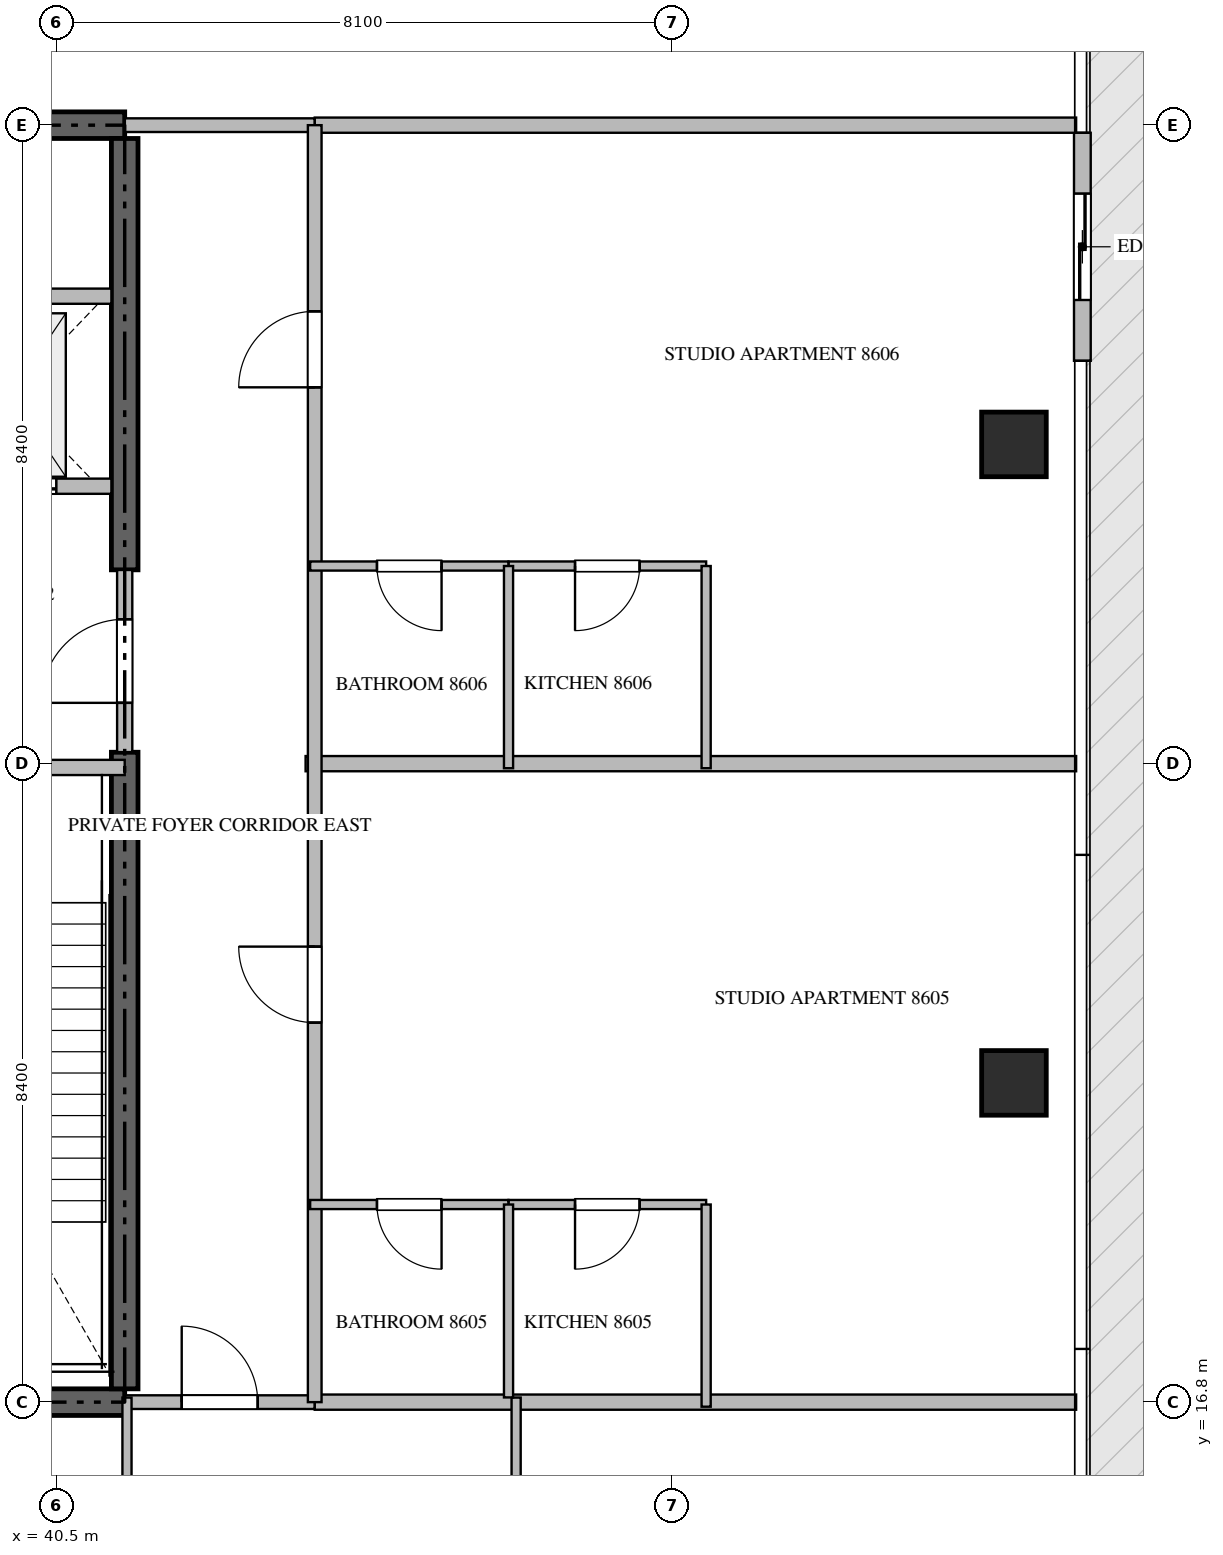
"""IFC4 building model, lengths in metres.
Left out: names, types, materials, properties, quantities, classifications, styles, units other than length and angle.
Written with IfcOpenShell. Run it as: python <this file> out.ifc"""

import sys

from ifc_helpers import new_model, si_unit, direction, frame, frame_2d, origin, origin_2d, place, context, subcontext, project, spatial, rectangle, extrude, source, transform, mapped, element, fill, save


model = new_model("IFC4")
c1 = context("Model", 3, precision=1e-05, world=origin(), true_north=direction((0.0, 1.0)))
c2 = subcontext(c1, "Body", "Model", "MODEL_VIEW")
j1 = project(units=[si_unit("LENGTHUNIT", "METRE"), si_unit("PLANEANGLEUNIT", "RADIAN")], contexts=[c1])
p1 = place(None, origin())
s1 = spatial("IfcSite", under=j1, at=p1, CompositionType="ELEMENT")
p2 = place(p1, origin())
s2 = spatial("IfcBuilding", under=s1, at=p2, CompositionType="ELEMENT")
p3 = place(p2, frame((0.0, 0.0, 347.95)))
s3 = spatial("IfcBuildingStorey", under=s2, at=p3, CompositionType="ELEMENT", Elevation=347.95)
for number, where, z_axis, x_axis in (
    (1, (23.4, 16.8, -0.26), (0.0, 0.0, 1.0), (1.0, 0.0, 0.0)),
    (2, (41.4, 33.6, -0.26), (0.0, 0.0, 1.0), (-1.0, 0.0, 0.0)),
):
    element("IfcWall", number, at=place(p3, frame(where, z_axis=z_axis, x_axis=x_axis)), inside=s3, PredefinedType="SHEAR", context=c2, shape_type="SweptSolid", body=[
        extrude(rectangle(XDim=18.0, YDim=0.35, at=frame_2d((9.0, 0.0))), origin(), (0.0, 0.0, 1.0), 5.898),
    ])
p4 = place(p3, frame((41.4, 16.975, -0.26), z_axis=(0.0, 0.0, 1.0), x_axis=(0.0, 1.0, 0.0)))
e3 = element("IfcWall", 3, at=p4, inside=s3, PredefinedType="SHEAR", context=c2, shape_type="SweptSolid", body=[
    extrude(rectangle(XDim=8.375, YDim=0.35, at=frame_2d((4.188, 0.0))), origin(), (0.0, 0.0, 1.0), 5.898),
])
p5 = place(p3, frame((41.4, 27.75, -0.26), z_axis=(0.0, 0.0, 1.0), x_axis=(0.0, 1.0, 0.0)))
e4 = element("IfcWall", 4, at=p5, inside=s3, PredefinedType="SHEAR", context=c2, shape_type="SweptSolid", body=[
    extrude(rectangle(XDim=5.675, YDim=0.35, at=frame_2d((2.837, 0.0))), origin(), (0.0, 0.0, 1.0), 5.898),
])
m1 = source(origin(), c2, "Body", "SweptSolid", [
    extrude(rectangle(XDim=0.85, YDim=0.85, at=origin_2d()), origin(), (0.0, 0.0, 1.0), 5.9),
])
for number, where, z_axis, x_axis in (
    (5, (53.1, 21.0, -0.26), (0.0, 0.0, 1.0), (1.0, 0.0, 0.0)),
    (6, (53.1, 29.4, -0.26), (0.0, 0.0, 1.0), (1.0, 0.0, 0.0)),
):
    element("IfcColumn", number, at=place(p3, frame(where, z_axis=z_axis, x_axis=x_axis)), inside=s3, PredefinedType="COLUMN", context=c2, shape_type="MappedRepresentation", body=[
        mapped(m1, transform((0.0, 0.0, 0.0), scale=1.0)),
    ])
p6 = place(p3, frame((54.0, 30.5, 0.0), z_axis=(0.0, 0.0, 1.0), x_axis=(0.0, 1.0, 0.0)))
e7 = element("IfcWall", 7, at=p6, inside=s3, PredefinedType="ELEMENTEDWALL", context=c2, shape_type="SweptSolid", body=[
    extrude(rectangle(XDim=3.0, YDim=0.22, at=frame_2d((1.5, 0.0))), origin(), (0.0, 0.0, 1.0), 5.625),
])
p7 = place(p6, frame((0.8, 0.0, 0.0)))
e8 = element("IfcOpeningElement", 8, at=p7, cuts=e7, PredefinedType="OPENING", context=c2, shape_type="SweptSolid", body=[
    extrude(rectangle(XDim=1.4, YDim=2.25, at=frame_2d((0.7, 1.125))), frame((0.0, 0.12, 0.0), z_axis=(0.0, -1.0, 0.0), x_axis=(1.0, 0.0, 0.0)), (0.0, 0.0, 1.0), 0.24),
])
p8 = place(p3, frame((36.95, 25.15, 0.0), z_axis=(0.0, 0.0, 1.0), x_axis=(1.0, 0.0, 0.0)))
e9 = element("IfcWall", 9, at=p8, inside=s3, PredefinedType="STANDARD", context=c2, shape_type="SweptSolid", body=[
    extrude(rectangle(XDim=4.45, YDim=0.2, at=frame_2d((2.225, 0.0))), origin(), (0.0, 0.0, 1.0), 5.64),
])
p9 = place(p8, frame((1.65, 0.0, 0.0)))
e10 = element("IfcOpeningElement", 10, at=p9, cuts=e9, PredefinedType="OPENING", context=c2, shape_type="SweptSolid", body=[
    extrude(rectangle(XDim=1.1, YDim=2.15, at=frame_2d((0.55, 1.075))), frame((0.0, 0.11, 0.0), z_axis=(0.0, -1.0, 0.0), x_axis=(1.0, 0.0, 0.0)), (0.0, 0.0, 1.0), 0.22),
])
p10 = place(p3, frame((38.75, 28.85, 0.0), z_axis=(0.0, 0.0, 1.0), x_axis=(1.0, 0.0, 0.0)))
e11 = element("IfcWall", 11, at=p10, inside=s3, PredefinedType="STANDARD", context=c2, shape_type="SweptSolid", body=[
    extrude(rectangle(XDim=2.475, YDim=0.2, at=frame_2d((1.238, 0.0))), origin(), (0.0, 0.0, 1.0), 5.64),
])
p11 = place(p10, frame((0.55, 0.0, 0.0)))
e12 = element("IfcOpeningElement", 12, at=p11, cuts=e11, PredefinedType="OPENING", context=c2, shape_type="SweptSolid", body=[
    extrude(rectangle(XDim=1.2, YDim=2.2, at=frame_2d((0.6, 1.1))), frame((0.0, 0.11, 0.0), z_axis=(0.0, -1.0, 0.0), x_axis=(1.0, 0.0, 0.0)), (0.0, 0.0, 1.0), 0.22),
])
p12 = place(p3, frame((38.75, 31.35, 0.0), z_axis=(0.0, 0.0, 1.0), x_axis=(1.0, 0.0, 0.0)))
e13 = element("IfcWall", 13, at=p12, inside=s3, PredefinedType="STANDARD", context=c2, shape_type="SweptSolid", body=[
    extrude(rectangle(XDim=2.475, YDim=0.2, at=frame_2d((1.238, 0.0))), origin(), (0.0, 0.0, 1.0), 5.64),
])
p13 = place(p3, frame((41.4, 25.352, 0.0), z_axis=(0.0, 0.0, 1.0), x_axis=(0.0, 1.0, 0.0)))
e14 = element("IfcWall", 14, at=p13, inside=s3, PredefinedType="STANDARD", context=c2, shape_type="SweptSolid", body=[
    extrude(rectangle(XDim=2.396, YDim=0.2, at=frame_2d((1.198, 0.0))), origin(), (0.0, 0.0, 1.0), 5.64),
])
p14 = place(p13, frame((0.648, 0.0, 0.0)))
e15 = element("IfcOpeningElement", 15, at=p14, cuts=e14, PredefinedType="OPENING", context=c2, shape_type="SweptSolid", body=[
    extrude(rectangle(XDim=1.1, YDim=2.15, at=frame_2d((0.55, 1.075))), frame((0.0, 0.11, 0.0), z_axis=(0.0, -1.0, 0.0), x_axis=(1.0, 0.0, 0.0)), (0.0, 0.0, 1.0), 0.22),
])
p15 = place(p3, frame((43.78, 25.2, 0.0), z_axis=(0.0, 0.0, 1.0), x_axis=(1.0, 0.0, 0.0)))
e16 = element("IfcWall", 16, at=p15, inside=s3, PredefinedType="PARTITIONING", context=c2, shape_type="SweptSolid", body=[
    extrude(rectangle(XDim=10.138, YDim=0.2, at=frame_2d((5.069, 0.0))), origin(), (0.0, 0.0, 1.0), 5.64),
])
for number, where, z_axis, x_axis in (
    (17, (43.9, 16.8, 0.0), (0.0, 0.0, 1.0), (1.0, 0.0, 0.0)),
    (18, (43.9, 33.6, 0.0), (0.0, 0.0, 1.0), (1.0, 0.0, 0.0)),
):
    element("IfcWall", number, at=place(p3, frame(where, z_axis=z_axis, x_axis=x_axis)), inside=s3, PredefinedType="PARTITIONING", context=c2, shape_type="SweptSolid", body=[
        extrude(rectangle(XDim=10.018, YDim=0.2, at=frame_2d((5.009, 0.0))), origin(), (0.0, 0.0, 1.0), 5.64),
    ])
p16 = place(p3, frame((41.402, 16.8, 0.0), z_axis=(0.0, 0.0, 1.0), x_axis=(1.0, 0.0, 0.0)))
e19 = element("IfcWall", 19, at=p16, inside=s3, PredefinedType="PARTITIONING", context=c2, shape_type="SweptSolid", body=[
    extrude(rectangle(XDim=2.496, YDim=0.18, at=frame_2d((1.248, 0.0))), origin(), (0.0, 0.0, 1.0), 5.64),
])
p17 = place(p16, frame((0.748, 0.0, 0.0)))
e20 = element("IfcOpeningElement", 20, at=p17, cuts=e19, PredefinedType="OPENING", context=c2, shape_type="SweptSolid", body=[
    extrude(rectangle(XDim=1.0, YDim=2.15, at=frame_2d((0.5, 1.075))), frame((0.0, 0.1, 0.0), z_axis=(0.0, -1.0, 0.0), x_axis=(1.0, 0.0, 0.0)), (0.0, 0.0, 1.0), 0.2),
])
p18 = place(p3, frame((41.402, 33.6, 0.0), z_axis=(0.0, 0.0, 1.0), x_axis=(1.0, 0.0, 0.0)))
e21 = element("IfcWall", 21, at=p18, inside=s3, PredefinedType="PARTITIONING", context=c2, shape_type="SweptSolid", body=[
    extrude(rectangle(XDim=2.496, YDim=0.18, at=frame_2d((1.248, 0.0))), origin(), (0.0, 0.0, 1.0), 5.64),
])
p19 = place(p3, frame((43.9, 16.8, 0.0), z_axis=(0.0, 0.0, 1.0), x_axis=(0.0, 1.0, 0.0)))
e22 = element("IfcWall", 22, at=p19, inside=s3, PredefinedType="PARTITIONING", context=c2, shape_type="SweptSolid", body=[
    extrude(rectangle(XDim=16.8, YDim=0.18, at=frame_2d((8.4, 0.0))), origin(), (0.0, 0.0, 1.0), 5.64),
])
p20 = place(p19, frame((4.993, 0.0, 0.0)))
e23 = element("IfcOpeningElement", 23, at=p20, cuts=e22, PredefinedType="OPENING", context=c2, shape_type="SweptSolid", body=[
    extrude(rectangle(XDim=1.0, YDim=2.15, at=frame_2d((0.5, 1.075))), frame((0.0, 0.1, 0.0), z_axis=(0.0, -1.0, 0.0), x_axis=(1.0, 0.0, 0.0)), (0.0, 0.0, 1.0), 0.2),
])
p21 = place(p19, frame((13.351, 0.0, 0.0)))
e24 = element("IfcOpeningElement", 24, at=p21, cuts=e22, PredefinedType="OPENING", context=c2, shape_type="SweptSolid", body=[
    extrude(rectangle(XDim=1.0, YDim=2.15, at=frame_2d((0.5, 1.075))), frame((0.0, 0.1, 0.0), z_axis=(0.0, -1.0, 0.0), x_axis=(1.0, 0.0, 0.0)), (0.0, 0.0, 1.0), 0.2),
])
p22 = place(p3, frame((41.43, 14.05, 0.0), z_axis=(0.0, 0.0, 1.0), x_axis=(0.0, 1.0, 0.0)))
e25 = element("IfcWall", 25, at=p22, inside=s3, PredefinedType="PARTITIONING", context=c2, shape_type="SweptSolid", body=[
    extrude(rectangle(XDim=2.81, YDim=0.12, at=frame_2d((1.405, 0.0))), origin(), (0.0, 0.0, 1.0), 5.64),
])
p23 = place(p3, frame((46.55, 13.302, 0.0), z_axis=(0.0, 0.0, 1.0), x_axis=(0.0, 1.0, 0.0)))
e26 = element("IfcWall", 26, at=p23, inside=s3, PredefinedType="PARTITIONING", context=c2, shape_type="SweptSolid", body=[
    extrude(rectangle(XDim=3.558, YDim=0.12, at=frame_2d((1.779, 0.0))), origin(), (0.0, 0.0, 1.0), 5.64),
])
p24 = place(p23, frame((1.354, 0.0, 0.0)))
e27 = element("IfcOpeningElement", 27, at=p24, cuts=e26, PredefinedType="OPENING", context=c2, shape_type="SweptSolid", body=[
    extrude(rectangle(XDim=0.85, YDim=2.1, at=frame_2d((0.425, 1.05))), frame((0.0, 0.07, 0.0), z_axis=(0.0, -1.0, 0.0), x_axis=(1.0, 0.0, 0.0)), (0.0, 0.0, 1.0), 0.14),
])
p25 = place(p3, frame((49.05, 19.4, 0.0), z_axis=(0.0, 0.0, 1.0), x_axis=(-1.0, 0.0, 0.0)))
e28 = element("IfcWall", 28, at=p25, inside=s3, PredefinedType="PARTITIONING", context=c2, shape_type="SweptSolid", body=[
    extrude(rectangle(XDim=2.6, YDim=0.12, at=frame_2d((1.3, 0.0))), origin(), (0.0, 0.0, 1.0), 5.64),
])
p26 = place(p25, frame((0.875, 0.0, 0.0)))
e29 = element("IfcOpeningElement", 29, at=p26, cuts=e28, PredefinedType="OPENING", context=c2, shape_type="SweptSolid", body=[
    extrude(rectangle(XDim=0.85, YDim=2.1, at=frame_2d((0.425, 1.05))), frame((0.0, 0.07, 0.0), z_axis=(0.0, -1.0, 0.0), x_axis=(1.0, 0.0, 0.0)), (0.0, 0.0, 1.0), 0.14),
])
p27 = place(p3, frame((46.448, 19.4, 0.0), z_axis=(0.0, 0.0, 1.0), x_axis=(-1.0, 0.0, 0.0)))
e30 = element("IfcWall", 30, at=p27, inside=s3, PredefinedType="PARTITIONING", context=c2, shape_type="SweptSolid", body=[
    extrude(rectangle(XDim=2.608, YDim=0.12, at=frame_2d((1.304, 0.0))), origin(), (0.0, 0.0, 1.0), 5.64),
])
p28 = place(p27, frame((0.879, 0.0, 0.0)))
e31 = element("IfcOpeningElement", 31, at=p28, cuts=e30, PredefinedType="OPENING", context=c2, shape_type="SweptSolid", body=[
    extrude(rectangle(XDim=0.85, YDim=2.1, at=frame_2d((0.425, 1.05))), frame((0.0, 0.07, 0.0), z_axis=(0.0, -1.0, 0.0), x_axis=(1.0, 0.0, 0.0)), (0.0, 0.0, 1.0), 0.14),
])
p29 = place(p3, frame((46.45, 16.862, 0.0), z_axis=(0.0, 0.0, 1.0), x_axis=(0.0, 1.0, 0.0)))
e32 = element("IfcWall", 32, at=p29, inside=s3, PredefinedType="PARTITIONING", context=c2, shape_type="SweptSolid", body=[
    extrude(rectangle(XDim=2.538, YDim=0.12, at=frame_2d((1.269, 0.0))), origin(), (0.0, 0.0, 1.0), 5.64),
])
p30 = place(p3, frame((49.05, 16.74, 0.0), z_axis=(0.0, 0.0, 1.0), x_axis=(0.0, 1.0, 0.0)))
e33 = element("IfcWall", 33, at=p30, inside=s3, PredefinedType="PARTITIONING", context=c2, shape_type="SweptSolid", body=[
    extrude(rectangle(XDim=2.66, YDim=0.12, at=frame_2d((1.33, 0.0))), origin(), (0.0, 0.0, 1.0), 5.64),
])
p31 = place(p3, frame((49.05, 27.8, 0.0), z_axis=(0.0, 0.0, 1.0), x_axis=(-1.0, 0.0, 0.0)))
e34 = element("IfcWall", 34, at=p31, inside=s3, PredefinedType="PARTITIONING", context=c2, shape_type="SweptSolid", body=[
    extrude(rectangle(XDim=2.6, YDim=0.12, at=frame_2d((1.3, 0.0))), origin(), (0.0, 0.0, 1.0), 5.64),
])
p32 = place(p31, frame((0.875, 0.0, 0.0)))
e35 = element("IfcOpeningElement", 35, at=p32, cuts=e34, PredefinedType="OPENING", context=c2, shape_type="SweptSolid", body=[
    extrude(rectangle(XDim=0.85, YDim=2.1, at=frame_2d((0.425, 1.05))), frame((0.0, 0.07, 0.0), z_axis=(0.0, -1.0, 0.0), x_axis=(1.0, 0.0, 0.0)), (0.0, 0.0, 1.0), 0.14),
])
p33 = place(p3, frame((46.448, 27.8, 0.0), z_axis=(0.0, 0.0, 1.0), x_axis=(-1.0, 0.0, 0.0)))
e36 = element("IfcWall", 36, at=p33, inside=s3, PredefinedType="PARTITIONING", context=c2, shape_type="SweptSolid", body=[
    extrude(rectangle(XDim=2.608, YDim=0.12, at=frame_2d((1.304, 0.0))), origin(), (0.0, 0.0, 1.0), 5.64),
])
p34 = place(p33, frame((0.879, 0.0, 0.0)))
e37 = element("IfcOpeningElement", 37, at=p34, cuts=e36, PredefinedType="OPENING", context=c2, shape_type="SweptSolid", body=[
    extrude(rectangle(XDim=0.85, YDim=2.1, at=frame_2d((0.425, 1.05))), frame((0.0, 0.07, 0.0), z_axis=(0.0, -1.0, 0.0), x_axis=(1.0, 0.0, 0.0)), (0.0, 0.0, 1.0), 0.14),
])
for number, where, z_axis, x_axis in (
    (38, (46.45, 25.14, 0.0), (0.0, 0.0, 1.0), (0.0, 1.0, 0.0)),
    (39, (49.05, 25.14, 0.0), (0.0, 0.0, 1.0), (0.0, 1.0, 0.0)),
):
    element("IfcWall", number, at=place(p3, frame(where, z_axis=z_axis, x_axis=x_axis)), inside=s3, PredefinedType="PARTITIONING", context=c2, shape_type="SweptSolid", body=[
        extrude(rectangle(XDim=2.66, YDim=0.12, at=frame_2d((1.33, 0.0))), origin(), (0.0, 0.0, 1.0), 5.64),
    ])
m2 = source(origin(), c2, "Body", "SweptSolid", [
    extrude(rectangle(XDim=1.4, YDim=2.25, at=frame_2d((0.7, 1.125))), frame((0.0, 0.025, 0.0), z_axis=(0.0, -1.0, 0.0), x_axis=(1.0, 0.0, 0.0)), (0.0, 0.0, 1.0), 0.05),
])
p35 = place(p7, origin())
e40 = element("IfcDoor", 40, at=p35, inside=s3, OperationType="SLIDING_TO_LEFT", PredefinedType="DOOR", context=c2, shape_type="MappedRepresentation", body=[
    mapped(m2, transform((0.0, 0.0, 0.0), scale=1.0)),
])
fill(e8, e40)
m3 = source(origin(), c2, "Body", "SweptSolid", [
    extrude(rectangle(XDim=1.2, YDim=2.2, at=frame_2d((0.6, 1.1))), frame((0.0, 0.025, 0.0), z_axis=(0.0, -1.0, 0.0), x_axis=(1.0, 0.0, 0.0)), (0.0, 0.0, 1.0), 0.05),
])
p36 = place(p11, origin())
e41 = element("IfcDoor", 41, at=p36, inside=s3, OperationType="DOUBLE_DOOR_SLIDING", PredefinedType="DOOR", context=c2, shape_type="MappedRepresentation", body=[
    mapped(m3, transform((0.0, 0.0, 0.0), scale=1.0)),
])
fill(e12, e41)
m4 = source(origin(), c2, "Body", "SweptSolid", [
    extrude(rectangle(XDim=1.1, YDim=2.15, at=frame_2d((0.55, 1.075))), frame((0.0, 0.025, 0.0), z_axis=(0.0, -1.0, 0.0), x_axis=(1.0, 0.0, 0.0)), (0.0, 0.0, 1.0), 0.05),
])
p37 = place(p14, origin())
e42 = element("IfcDoor", 42, at=p37, inside=s3, OperationType="SINGLE_SWING_LEFT", PredefinedType="DOOR", context=c2, shape_type="MappedRepresentation", body=[
    mapped(m4, transform((0.0, 0.0, 0.0), scale=1.0)),
])
fill(e15, e42)
m5 = source(origin(), c2, "Body", "SweptSolid", [
    extrude(rectangle(XDim=1.0, YDim=2.15, at=frame_2d((0.5, 1.075))), frame((0.0, 0.025, 0.0), z_axis=(0.0, -1.0, 0.0), x_axis=(1.0, 0.0, 0.0)), (0.0, 0.0, 1.0), 0.05),
])
p38 = place(p17, origin())
e43 = element("IfcDoor", 43, at=p38, inside=s3, OperationType="SINGLE_SWING_LEFT", PredefinedType="DOOR", context=c2, shape_type="MappedRepresentation", body=[
    mapped(m5, transform((0.0, 0.0, 0.0), scale=1.0)),
])
fill(e20, e43)
p39 = place(p20, origin())
e44 = element("IfcDoor", 44, at=p39, inside=s3, OperationType="SINGLE_SWING_RIGHT", PredefinedType="DOOR", context=c2, shape_type="MappedRepresentation", body=[
    mapped(m5, transform((0.0, 0.0, 0.0), scale=1.0)),
])
fill(e23, e44)
p40 = place(p21, origin())
e45 = element("IfcDoor", 45, at=p40, inside=s3, OperationType="SINGLE_SWING_LEFT", PredefinedType="DOOR", context=c2, shape_type="MappedRepresentation", body=[
    mapped(m5, transform((0.0, 0.0, 0.0), scale=1.0)),
])
fill(e24, e45)
m6 = source(origin(), c2, "Body", "SweptSolid", [
    extrude(rectangle(XDim=0.85, YDim=2.1, at=frame_2d((0.425, 1.05))), frame((0.0, 0.025, 0.0), z_axis=(0.0, -1.0, 0.0), x_axis=(1.0, 0.0, 0.0)), (0.0, 0.0, 1.0), 0.05),
])
p41 = place(p26, origin())
e46 = element("IfcDoor", 46, at=p41, inside=s3, OperationType="SINGLE_SWING_RIGHT", PredefinedType="DOOR", context=c2, shape_type="MappedRepresentation", body=[
    mapped(m6, transform((0.0, 0.0, 0.0), scale=1.0)),
])
fill(e29, e46)
p42 = place(p28, origin())
e47 = element("IfcDoor", 47, at=p42, inside=s3, OperationType="SINGLE_SWING_LEFT", PredefinedType="DOOR", context=c2, shape_type="MappedRepresentation", body=[
    mapped(m6, transform((0.0, 0.0, 0.0), scale=1.0)),
])
fill(e31, e47)
p43 = place(p32, origin())
e48 = element("IfcDoor", 48, at=p43, inside=s3, OperationType="SINGLE_SWING_RIGHT", PredefinedType="DOOR", context=c2, shape_type="MappedRepresentation", body=[
    mapped(m6, transform((0.0, 0.0, 0.0), scale=1.0)),
])
fill(e35, e48)
p44 = place(p34, origin())
e49 = element("IfcDoor", 49, at=p44, inside=s3, OperationType="SINGLE_SWING_LEFT", PredefinedType="DOOR", context=c2, shape_type="MappedRepresentation", body=[
    mapped(m6, transform((0.0, 0.0, 0.0), scale=1.0)),
])
fill(e37, e49)
save(model, sys.argv[1])
